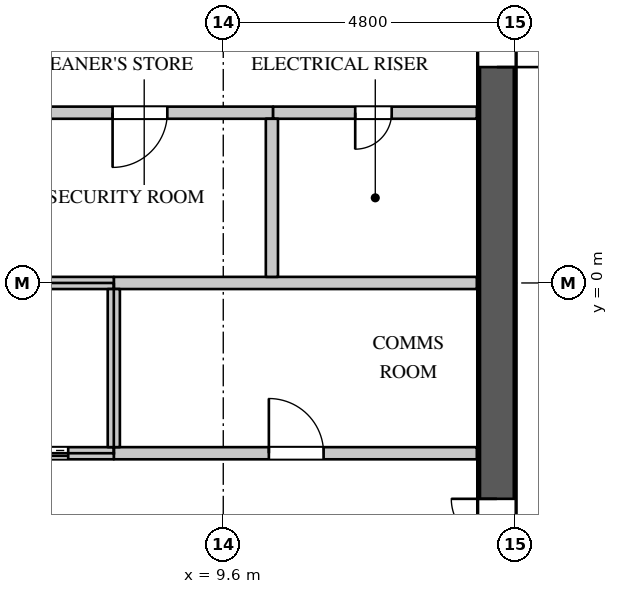
"""IFC4 building model, lengths in metres.
Left out: names, types, materials, properties, quantities, classifications, styles, units other than length and angle.
Written with IfcOpenShell. Run it as: python <this file> out.ifc"""

import sys

from ifc_helpers import new_model, si_unit, direction, frame, frame_2d, origin, place, context, subcontext, project, spatial, rectangle, extrude, element, fill, save


model = new_model("IFC4")
c1 = context("Model", 3, precision=1e-05, world=origin(), true_north=direction((0.0, 1.0)))
c2 = subcontext(c1, "Body", "Model", "MODEL_VIEW")
j1 = project(units=[si_unit("LENGTHUNIT", "METRE"), si_unit("PLANEANGLEUNIT", "RADIAN")], contexts=[c1])
p1 = place(None, origin())
s1 = spatial("IfcSite", under=j1, at=p1, CompositionType="ELEMENT")
p2 = place(p1, origin())
s2 = spatial("IfcBuilding", under=s1, at=p2, CompositionType="ELEMENT")
p3 = place(p2, frame((0.0, 0.0, 272.7)))
s3 = spatial("IfcBuildingStorey", under=s2, at=p3, CompositionType="ELEMENT", Elevation=272.7)
p4 = place(p3, frame((14.1, -11.4, 0.0), z_axis=(0.0, 0.0, 1.0), x_axis=(0.0, 1.0, 0.0)))
e1 = element("IfcWall", 1, at=p4, inside=s3, PredefinedType="SHEAR", context=c2, shape_type="SweptSolid", body=[
    extrude(rectangle(XDim=22.8, YDim=0.6, at=frame_2d((11.4, 0.0))), origin(), (0.0, 0.0, 1.0), 4.2),
])
p5 = place(p4, frame((20.45, 0.0, 0.0)))
e2 = element("IfcOpeningElement", 2, at=p5, cuts=e1, PredefinedType="OPENING", context=c2, shape_type="SweptSolid", body=[
    extrude(rectangle(XDim=1.1, YDim=2.2, at=frame_2d((0.55, 1.1))), frame((0.0, 0.31, 0.0), z_axis=(0.0, -1.0, 0.0), x_axis=(1.0, 0.0, 0.0)), (0.0, 0.0, 1.0), 0.62),
])
p6 = place(p4, frame((1.25, 0.0, 0.0)))
e3 = element("IfcOpeningElement", 3, at=p6, cuts=e1, PredefinedType="OPENING", context=c2, shape_type="SweptSolid", body=[
    extrude(rectangle(XDim=1.1, YDim=2.2, at=frame_2d((0.55, 1.1))), frame((0.0, 0.31, 0.0), z_axis=(0.0, -1.0, 0.0), x_axis=(1.0, 0.0, 0.0)), (0.0, 0.0, 1.0), 0.62),
])
p7 = place(p4, frame((14.95, 0.0, 0.0)))
e4 = element("IfcOpeningElement", 4, at=p7, cuts=e1, PredefinedType="OPENING", context=c2, shape_type="SweptSolid", body=[
    extrude(rectangle(XDim=1.5, YDim=2.4, at=frame_2d((0.75, 1.2))), frame((0.0, 0.31, 0.0), z_axis=(0.0, -1.0, 0.0), x_axis=(1.0, 0.0, 0.0)), (0.0, 0.0, 1.0), 0.62),
])
p8 = place(p4, frame((6.35, 0.0, 0.0)))
e5 = element("IfcOpeningElement", 5, at=p8, cuts=e1, PredefinedType="OPENING", context=c2, shape_type="SweptSolid", body=[
    extrude(rectangle(XDim=1.5, YDim=2.4, at=frame_2d((0.75, 1.2))), frame((0.0, 0.31, 0.0), z_axis=(0.0, -1.0, 0.0), x_axis=(1.0, 0.0, 0.0)), (0.0, 0.0, 1.0), 0.62),
])
p9 = place(p3, frame((-7.82, 2.8, 0.0), z_axis=(0.0, 0.0, 1.0), x_axis=(1.0, 0.0, 0.0)))
e6 = element("IfcWall", 6, at=p9, inside=s3, PredefinedType="PARTITIONING", context=c2, shape_type="SweptSolid", body=[
    extrude(rectangle(XDim=18.24, YDim=0.2, at=frame_2d((9.12, 0.0))), origin(), (0.0, 0.0, 1.0), 3.95),
])
p10 = place(p9, frame((2.0, 0.0, 0.0)))
e7 = element("IfcOpeningElement", 7, at=p10, cuts=e6, PredefinedType="OPENING", context=c2, shape_type="SweptSolid", body=[
    extrude(rectangle(XDim=0.9, YDim=2.2, at=frame_2d((0.45, 1.1))), frame((0.0, 0.11, 0.0), z_axis=(0.0, -1.0, 0.0), x_axis=(1.0, 0.0, 0.0)), (0.0, 0.0, 1.0), 0.22),
])
p11 = place(p9, frame((6.25, 0.0, 0.0)))
e8 = element("IfcOpeningElement", 8, at=p11, cuts=e6, PredefinedType="OPENING", context=c2, shape_type="SweptSolid", body=[
    extrude(rectangle(XDim=0.9, YDim=2.2, at=frame_2d((0.45, 1.1))), frame((0.0, 0.11, 0.0), z_axis=(0.0, -1.0, 0.0), x_axis=(1.0, 0.0, 0.0)), (0.0, 0.0, 1.0), 0.22),
])
p12 = place(p9, frame((9.65, 0.0, 0.0)))
e9 = element("IfcOpeningElement", 9, at=p12, cuts=e6, PredefinedType="OPENING", context=c2, shape_type="SweptSolid", body=[
    extrude(rectangle(XDim=0.9, YDim=2.2, at=frame_2d((0.45, 1.1))), frame((0.0, 0.11, 0.0), z_axis=(0.0, -1.0, 0.0), x_axis=(1.0, 0.0, 0.0)), (0.0, 0.0, 1.0), 0.22),
])
p13 = place(p9, frame((12.35, 0.0, 0.0)))
e10 = element("IfcOpeningElement", 10, at=p13, cuts=e6, PredefinedType="OPENING", context=c2, shape_type="SweptSolid", body=[
    extrude(rectangle(XDim=0.9, YDim=2.2, at=frame_2d((0.45, 1.1))), frame((0.0, 0.11, 0.0), z_axis=(0.0, -1.0, 0.0), x_axis=(1.0, 0.0, 0.0)), (0.0, 0.0, 1.0), 0.22),
])
p14 = place(p9, frame((15.6, 0.0, 0.0)))
e11 = element("IfcOpeningElement", 11, at=p14, cuts=e6, PredefinedType="OPENING", context=c2, shape_type="SweptSolid", body=[
    extrude(rectangle(XDim=0.9, YDim=2.2, at=frame_2d((0.45, 1.1))), frame((0.0, 0.11, 0.0), z_axis=(0.0, -1.0, 0.0), x_axis=(1.0, 0.0, 0.0)), (0.0, 0.0, 1.0), 0.22),
])
p15 = place(p3, frame((7.8, -2.8, 0.0), z_axis=(0.0, 0.0, 1.0), x_axis=(1.0, 0.0, 0.0)))
e12 = element("IfcWall", 12, at=p15, inside=s3, PredefinedType="PARTITIONING", context=c2, shape_type="SweptSolid", body=[
    extrude(rectangle(XDim=5.97, YDim=0.2, at=frame_2d((2.985, 0.0))), origin(), (0.0, 0.0, 1.0), 3.95),
])
p16 = place(p15, frame((2.55, 0.0, 0.0)))
e13 = element("IfcOpeningElement", 13, at=p16, cuts=e12, PredefinedType="OPENING", context=c2, shape_type="SweptSolid", body=[
    extrude(rectangle(XDim=0.9, YDim=2.2, at=frame_2d((0.45, 1.1))), frame((0.0, 0.11, 0.0), z_axis=(0.0, -1.0, 0.0), x_axis=(1.0, 0.0, 0.0)), (0.0, 0.0, 1.0), 0.22),
])
p17 = place(p3, frame((7.8, 0.0, 0.0), z_axis=(0.0, 0.0, 1.0), x_axis=(1.0, 0.0, 0.0)))
e14 = element("IfcWall", 14, at=p17, inside=s3, PredefinedType="PARTITIONING", context=c2, shape_type="SweptSolid", body=[
    extrude(rectangle(XDim=5.97, YDim=0.2, at=frame_2d((2.985, 0.0))), origin(), (0.0, 0.0, 1.0), 3.95),
])
p18 = place(p3, frame((10.42, 2.8, 0.0), z_axis=(0.0, 0.0, 1.0), x_axis=(1.0, 0.0, 0.0)))
e15 = element("IfcWall", 15, at=p18, inside=s3, PredefinedType="PARTITIONING", context=c2, shape_type="SweptSolid", body=[
    extrude(rectangle(XDim=3.35, YDim=0.2, at=frame_2d((1.675, 0.0))), origin(), (0.0, 0.0, 1.0), 3.95),
])
p19 = place(p18, frame((1.35, 0.0, 0.0)))
e16 = element("IfcOpeningElement", 16, at=p19, cuts=e15, PredefinedType="OPENING", context=c2, shape_type="SweptSolid", body=[
    extrude(rectangle(XDim=0.6, YDim=2.0, at=frame_2d((0.3, 1.0))), frame((0.0, 0.11, 0.0), z_axis=(0.0, -1.0, 0.0), x_axis=(1.0, 0.0, 0.0)), (0.0, 0.0, 1.0), 0.22),
])
p20 = place(p3, frame((10.4, 0.1, 0.0), z_axis=(0.0, 0.0, 1.0), x_axis=(0.0, 1.0, 0.0)))
e17 = element("IfcWall", 17, at=p20, inside=s3, PredefinedType="PARTITIONING", context=c2, shape_type="SweptSolid", body=[
    extrude(rectangle(XDim=2.6, YDim=0.2, at=frame_2d((1.3, 0.0))), origin(), (0.0, 0.0, 1.0), 3.95),
])
p21 = place(p3, frame((-13.77, 0.0, 0.0), z_axis=(0.0, 0.0, 1.0), x_axis=(1.0, 0.0, 0.0)))
e18 = element("IfcWall", 18, at=p21, inside=s3, PredefinedType="PARTITIONING", context=c2, shape_type="SweptSolid", body=[
    extrude(rectangle(XDim=21.57, YDim=0.2, at=frame_2d((10.785, 0.0))), origin(), (0.0, 0.0, 1.0), 3.95),
])
p22 = place(p3, frame((-10.4, -2.8, 0.0), z_axis=(0.0, 0.0, 1.0), x_axis=(1.0, 0.0, 0.0)))
e19 = element("IfcWall", 19, at=p22, inside=s3, PredefinedType="PARTITIONING", context=c2, shape_type="SweptSolid", body=[
    extrude(rectangle(XDim=18.2, YDim=0.2, at=frame_2d((9.1, 0.0))), origin(), (0.0, 0.0, 1.0), 3.95),
])
p23 = place(p22, frame((0.75, 0.0, 0.0)))
e20 = element("IfcOpeningElement", 20, at=p23, cuts=e19, PredefinedType="OPENING", context=c2, shape_type="SweptSolid", body=[
    extrude(rectangle(XDim=1.1, YDim=2.2, at=frame_2d((0.55, 1.1))), frame((0.0, 0.11, 0.0), z_axis=(0.0, -1.0, 0.0), x_axis=(1.0, 0.0, 0.0)), (0.0, 0.0, 1.0), 0.22),
])
p24 = place(p22, frame((3.35, 0.0, 0.0)))
e21 = element("IfcOpeningElement", 21, at=p24, cuts=e19, PredefinedType="OPENING", context=c2, shape_type="SweptSolid", body=[
    extrude(rectangle(XDim=1.1, YDim=2.2, at=frame_2d((0.55, 1.1))), frame((0.0, 0.11, 0.0), z_axis=(0.0, -1.0, 0.0), x_axis=(1.0, 0.0, 0.0)), (0.0, 0.0, 1.0), 0.22),
])
p25 = place(p22, frame((5.95, 0.0, 0.0)))
e22 = element("IfcOpeningElement", 22, at=p25, cuts=e19, PredefinedType="OPENING", context=c2, shape_type="SweptSolid", body=[
    extrude(rectangle(XDim=1.1, YDim=2.2, at=frame_2d((0.55, 1.1))), frame((0.0, 0.11, 0.0), z_axis=(0.0, -1.0, 0.0), x_axis=(1.0, 0.0, 0.0)), (0.0, 0.0, 1.0), 0.22),
])
p26 = place(p22, frame((8.55, 0.0, 0.0)))
e23 = element("IfcOpeningElement", 23, at=p26, cuts=e19, PredefinedType="OPENING", context=c2, shape_type="SweptSolid", body=[
    extrude(rectangle(XDim=1.1, YDim=2.2, at=frame_2d((0.55, 1.1))), frame((0.0, 0.11, 0.0), z_axis=(0.0, -1.0, 0.0), x_axis=(1.0, 0.0, 0.0)), (0.0, 0.0, 1.0), 0.22),
])
p27 = place(p22, frame((11.15, 0.0, 0.0)))
e24 = element("IfcOpeningElement", 24, at=p27, cuts=e19, PredefinedType="OPENING", context=c2, shape_type="SweptSolid", body=[
    extrude(rectangle(XDim=1.1, YDim=2.2, at=frame_2d((0.55, 1.1))), frame((0.0, 0.11, 0.0), z_axis=(0.0, -1.0, 0.0), x_axis=(1.0, 0.0, 0.0)), (0.0, 0.0, 1.0), 0.22),
])
p28 = place(p22, frame((13.75, 0.0, 0.0)))
e25 = element("IfcOpeningElement", 25, at=p28, cuts=e19, PredefinedType="OPENING", context=c2, shape_type="SweptSolid", body=[
    extrude(rectangle(XDim=1.1, YDim=2.2, at=frame_2d((0.55, 1.1))), frame((0.0, 0.11, 0.0), z_axis=(0.0, -1.0, 0.0), x_axis=(1.0, 0.0, 0.0)), (0.0, 0.0, 1.0), 0.22),
])
p29 = place(p22, frame((16.35, 0.0, 0.0)))
e26 = element("IfcOpeningElement", 26, at=p29, cuts=e19, PredefinedType="OPENING", context=c2, shape_type="SweptSolid", body=[
    extrude(rectangle(XDim=1.1, YDim=2.2, at=frame_2d((0.55, 1.1))), frame((0.0, 0.11, 0.0), z_axis=(0.0, -1.0, 0.0), x_axis=(1.0, 0.0, 0.0)), (0.0, 0.0, 1.0), 0.22),
])
p30 = place(p3, frame((7.8, -2.7, 0.0), z_axis=(0.0, 0.0, 1.0), x_axis=(0.0, 1.0, 0.0)))
e27 = element("IfcWall", 27, at=p30, inside=s3, PredefinedType="PARTITIONING", context=c2, shape_type="SweptSolid", body=[
    extrude(rectangle(XDim=2.6, YDim=0.2, at=frame_2d((1.3, 0.0))), origin(), (0.0, 0.0, 1.0), 3.95),
])
p31 = place(p19, origin())
e28 = element("IfcDoor", 28, at=p31, inside=s3, OperationType="SINGLE_SWING_RIGHT", PredefinedType="DOOR", context=c2, shape_type="SweptSolid", body=[
    extrude(rectangle(XDim=0.6, YDim=2.0, at=frame_2d((0.3, 1.0))), frame((0.0, 0.025, 0.0), z_axis=(0.0, -1.0, 0.0), x_axis=(1.0, 0.0, 0.0)), (0.0, 0.0, 1.0), 0.05),
])
fill(e16, e28)
p32 = place(p16, origin())
e29 = element("IfcDoor", 29, at=p32, inside=s3, OperationType="SINGLE_SWING_LEFT", PredefinedType="DOOR", context=c2, shape_type="SweptSolid", body=[
    extrude(rectangle(XDim=0.9, YDim=2.2, at=frame_2d((0.45, 1.1))), frame((0.0, 0.025, 0.0), z_axis=(0.0, -1.0, 0.0), x_axis=(1.0, 0.0, 0.0)), (0.0, 0.0, 1.0), 0.05),
])
fill(e13, e29)
p33 = place(p14, origin())
e30 = element("IfcDoor", 30, at=p33, inside=s3, OperationType="SINGLE_SWING_RIGHT", PredefinedType="DOOR", context=c2, shape_type="SweptSolid", body=[
    extrude(rectangle(XDim=0.9, YDim=2.2, at=frame_2d((0.45, 1.1))), frame((0.0, 0.025, 0.0), z_axis=(0.0, -1.0, 0.0), x_axis=(1.0, 0.0, 0.0)), (0.0, 0.0, 1.0), 0.05),
])
fill(e11, e30)
p34 = place(p29, origin())
e31 = element("IfcDoor", 31, at=p34, inside=s3, OperationType="DOUBLE_DOOR_SLIDING", PredefinedType="DOOR", context=c2, shape_type="SweptSolid", body=[
    extrude(rectangle(XDim=1.1, YDim=2.2, at=frame_2d((0.55, 1.1))), frame((0.0, 0.025, 0.0), z_axis=(0.0, -1.0, 0.0), x_axis=(1.0, 0.0, 0.0)), (0.0, 0.0, 1.0), 0.05),
])
fill(e26, e31)
p35 = place(p7, origin())
e32 = element("IfcDoor", 32, at=p35, inside=s3, OperationType="DOUBLE_DOOR_SINGLE_SWING", PredefinedType="DOOR", context=c2, shape_type="SweptSolid", body=[
    extrude(rectangle(XDim=1.5, YDim=2.4, at=frame_2d((0.75, 1.2))), frame((0.0, -0.245, 0.0), z_axis=(0.0, -1.0, 0.0), x_axis=(1.0, 0.0, 0.0)), (0.0, 0.0, 1.0), 0.05),
])
fill(e4, e32)
p36 = place(p8, origin())
e33 = element("IfcDoor", 33, at=p36, inside=s3, OperationType="DOUBLE_DOOR_SINGLE_SWING", PredefinedType="DOOR", context=c2, shape_type="SweptSolid", body=[
    extrude(rectangle(XDim=1.5, YDim=2.4, at=frame_2d((0.75, 1.2))), frame((0.0, 0.295, 0.0), z_axis=(0.0, -1.0, 0.0), x_axis=(1.0, 0.0, 0.0)), (0.0, 0.0, 1.0), 0.05),
])
fill(e5, e33)
save(model, sys.argv[1])
